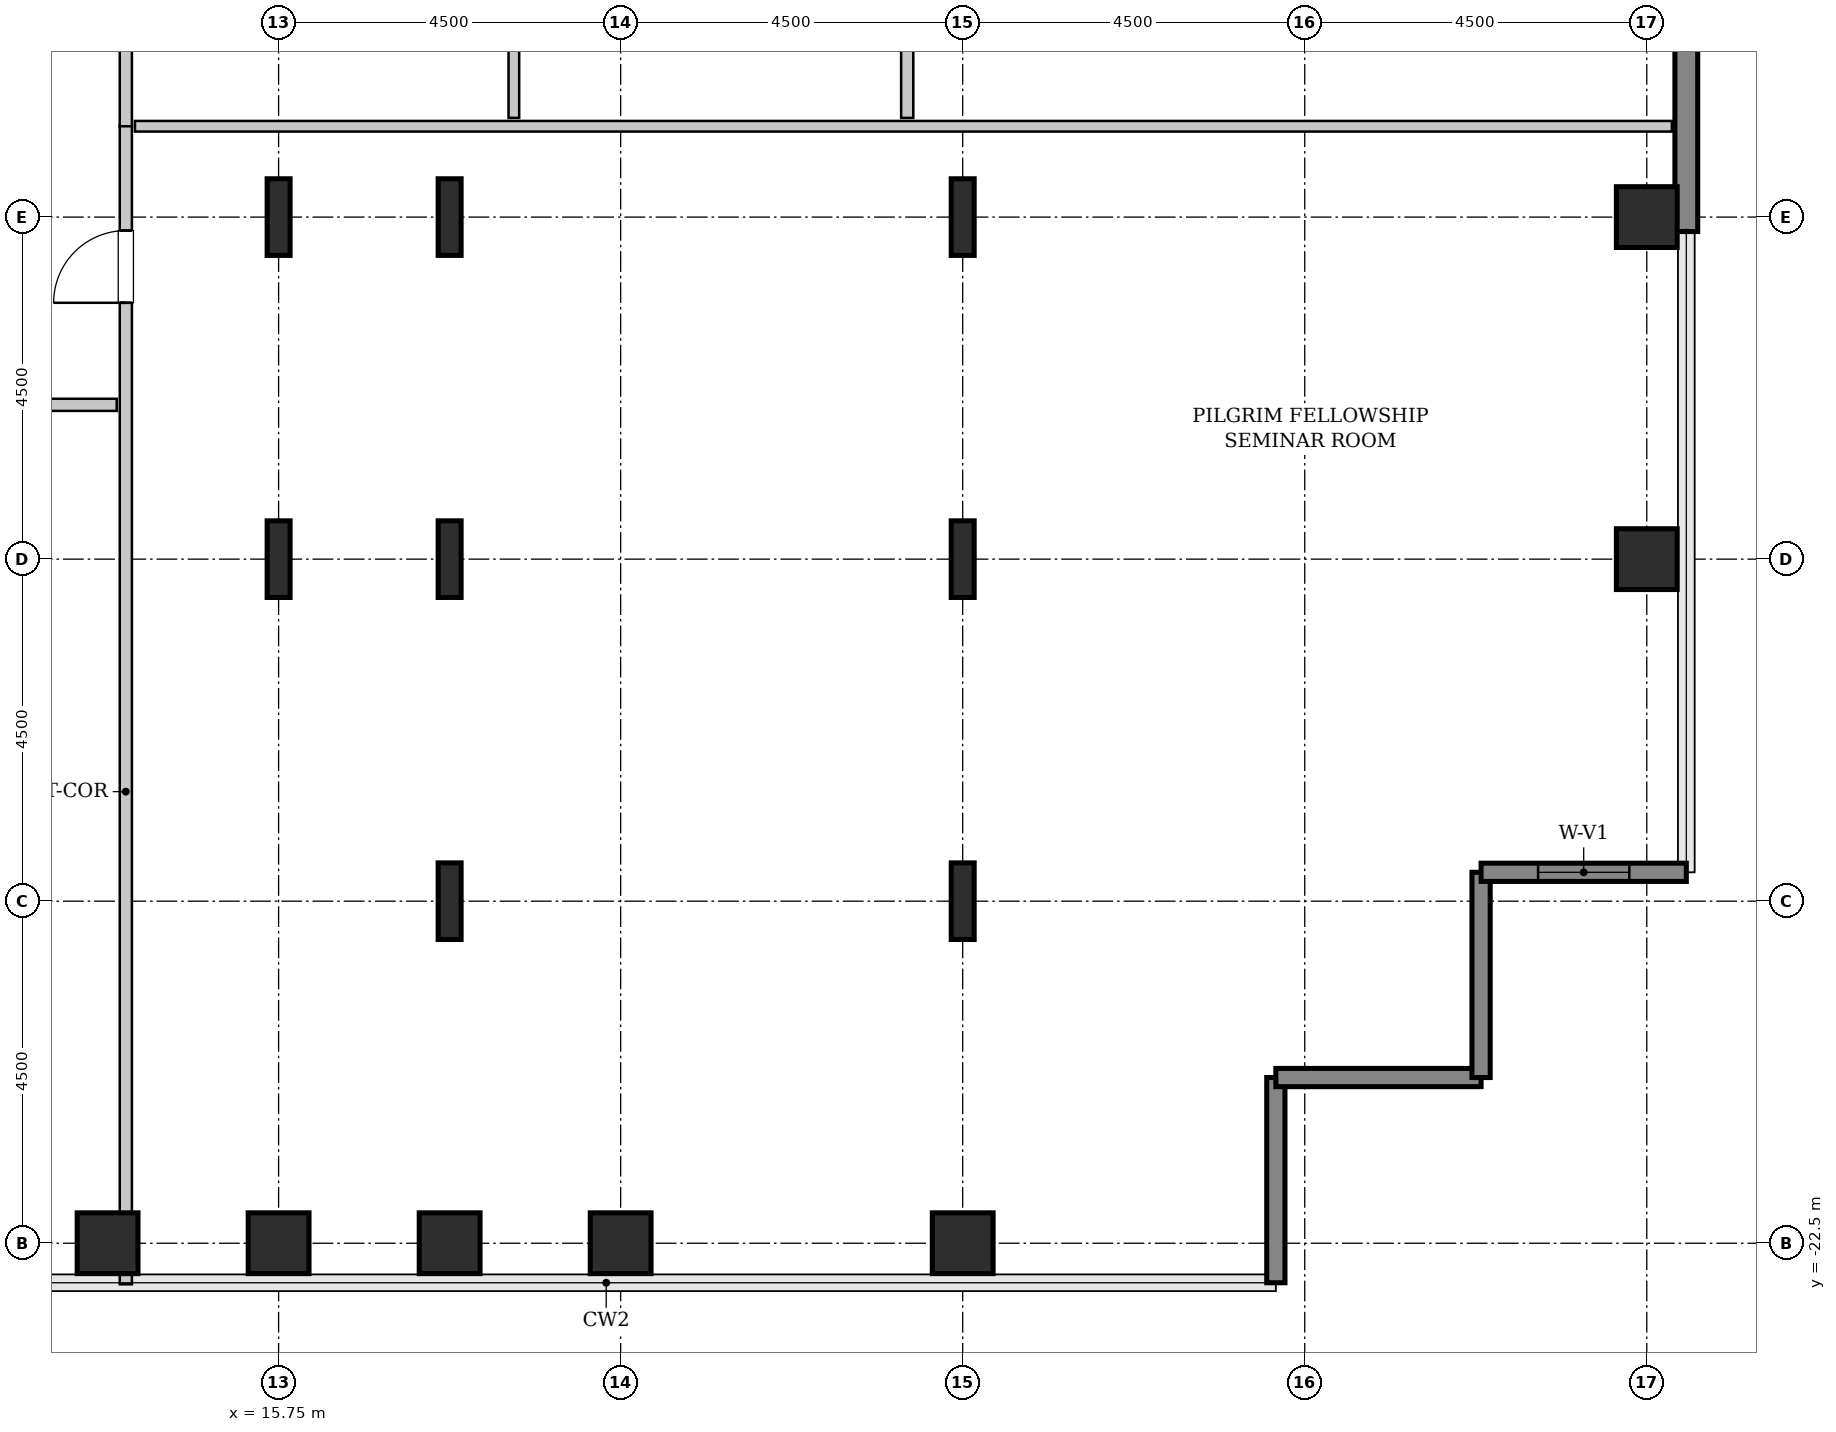
"""IFC4 building model, lengths in metres.
Left out: names, types, materials, properties, quantities, classifications, styles, units other than length and angle.
Written with IfcOpenShell. Run it as: python <this file> out.ifc"""

import sys

from ifc_helpers import new_model, si_unit, direction, frame, frame_2d, origin, origin_2d, place, context, subcontext, project, spatial, rectangle, hollow_rectangle, i_section, extrude, source, transform, mapped, element, fill, save


model = new_model("IFC4")
c1 = context("Model", 3, precision=1e-05, world=origin(), true_north=direction((0.0, 1.0)))
c2 = subcontext(c1, "Body", "Model", "MODEL_VIEW")
j1 = project(units=[si_unit("LENGTHUNIT", "METRE"), si_unit("PLANEANGLEUNIT", "RADIAN")], contexts=[c1])
p1 = place(None, origin())
s1 = spatial("IfcSite", under=j1, at=p1, CompositionType="ELEMENT")
p2 = place(p1, origin())
s2 = spatial("IfcBuilding", under=s1, at=p2, CompositionType="ELEMENT")
p3 = place(p2, frame((0.0, 0.0, 113.6)))
s3 = spatial("IfcBuildingStorey", under=s2, at=p3, CompositionType="ELEMENT", Elevation=113.6)
m1 = source(origin(), c2, "Body", "SweptSolid", [
    extrude(hollow_rectangle(XDim=0.8, YDim=0.8, WallThickness=0.04, InnerFilletRadius=0.04, OuterFilletRadius=0.08, at=origin_2d()), origin(), (0.0, 0.0, 1.0), 3.8),
])
for number, where, z_axis, x_axis in (
    (1, (13.5, -22.5, 0.0), (0.0, 0.0, 1.0), (1.0, 0.0, 0.0)),
    (2, (15.75, -22.5, 0.0), (0.0, 0.0, 1.0), (1.0, 0.0, 0.0)),
):
    element("IfcColumn", number, at=place(p3, frame(where, z_axis=z_axis, x_axis=x_axis)), inside=s3, PredefinedType="COLUMN", context=c2, shape_type="MappedRepresentation", body=[
        mapped(m1, transform((0.0, 0.0, 0.0), x_axis=(1.0, 0.0, 0.0), y_axis=(0.0, 1.0, 0.0), z_axis=(0.0, 0.0, 1.0), scale=1.0)),
    ])
m2 = source(origin(), c2, "Body", "SweptSolid", [
    extrude(i_section(OverallWidth=0.302, OverallDepth=1.008, WebThickness=0.021, FlangeThickness=0.04, FilletRadius=0.03, at=origin_2d()), origin(), (0.0, 0.0, 1.0), 3.8),
])
for number, where, z_axis, x_axis in (
    (3, (15.75, -13.5, 0.0), (0.0, 0.0, 1.0), (1.0, 0.0, 0.0)),
    (4, (15.75, -9.0, 0.0), (0.0, 0.0, 1.0), (1.0, 0.0, 0.0)),
):
    element("IfcColumn", number, at=place(p3, frame(where, z_axis=z_axis, x_axis=x_axis)), inside=s3, PredefinedType="COLUMN", context=c2, shape_type="MappedRepresentation", body=[
        mapped(m2, transform((0.0, 0.0, 0.0), x_axis=(1.0, 0.0, 0.0), y_axis=(0.0, 1.0, 0.0), z_axis=(0.0, 0.0, 1.0), scale=1.0)),
    ])
p4 = place(p3, frame((18.0, -22.5, 0.0), z_axis=(0.0, 0.0, 1.0), x_axis=(1.0, 0.0, 0.0)))
e5 = element("IfcColumn", 5, at=p4, inside=s3, PredefinedType="COLUMN", context=c2, shape_type="MappedRepresentation", body=[
    mapped(m1, transform((0.0, 0.0, 0.0), x_axis=(1.0, 0.0, 0.0), y_axis=(0.0, 1.0, 0.0), z_axis=(0.0, 0.0, 1.0), scale=1.0)),
])
for number, where, z_axis, x_axis in (
    (6, (18.0, -18.0, 0.0), (0.0, 0.0, 1.0), (1.0, 0.0, 0.0)),
    (7, (18.0, -13.5, 0.0), (0.0, 0.0, 1.0), (1.0, 0.0, 0.0)),
    (8, (18.0, -9.0, 0.0), (0.0, 0.0, 1.0), (1.0, 0.0, 0.0)),
):
    element("IfcColumn", number, at=place(p3, frame(where, z_axis=z_axis, x_axis=x_axis)), inside=s3, PredefinedType="COLUMN", context=c2, shape_type="MappedRepresentation", body=[
        mapped(m2, transform((0.0, 0.0, 0.0), x_axis=(1.0, 0.0, 0.0), y_axis=(0.0, 1.0, 0.0), z_axis=(0.0, 0.0, 1.0), scale=1.0)),
    ])
for number, where, z_axis, x_axis in (
    (9, (20.25, -22.5, 0.0), (0.0, 0.0, 1.0), (1.0, 0.0, 0.0)),
    (10, (24.75, -22.5, 0.0), (0.0, 0.0, 1.0), (1.0, 0.0, 0.0)),
):
    element("IfcColumn", number, at=place(p3, frame(where, z_axis=z_axis, x_axis=x_axis)), inside=s3, PredefinedType="COLUMN", context=c2, shape_type="MappedRepresentation", body=[
        mapped(m1, transform((0.0, 0.0, 0.0), x_axis=(1.0, 0.0, 0.0), y_axis=(0.0, 1.0, 0.0), z_axis=(0.0, 0.0, 1.0), scale=1.0)),
    ])
for number, where, z_axis, x_axis in (
    (11, (24.75, -18.0, 0.0), (0.0, 0.0, 1.0), (1.0, 0.0, 0.0)),
    (12, (24.75, -13.5, 0.0), (0.0, 0.0, 1.0), (1.0, 0.0, 0.0)),
    (13, (24.75, -9.0, 0.0), (0.0, 0.0, 1.0), (1.0, 0.0, 0.0)),
):
    element("IfcColumn", number, at=place(p3, frame(where, z_axis=z_axis, x_axis=x_axis)), inside=s3, PredefinedType="COLUMN", context=c2, shape_type="MappedRepresentation", body=[
        mapped(m2, transform((0.0, 0.0, 0.0), x_axis=(1.0, 0.0, 0.0), y_axis=(0.0, 1.0, 0.0), z_axis=(0.0, 0.0, 1.0), scale=1.0)),
    ])
for number, where, z_axis, x_axis in (
    (14, (33.75, -13.5, 0.0), (0.0, 0.0, 1.0), (1.0, 0.0, 0.0)),
    (15, (33.75, -9.0, 0.0), (0.0, 0.0, 1.0), (1.0, 0.0, 0.0)),
):
    element("IfcColumn", number, at=place(p3, frame(where, z_axis=z_axis, x_axis=x_axis)), inside=s3, PredefinedType="COLUMN", context=c2, shape_type="MappedRepresentation", body=[
        mapped(m1, transform((0.0, 0.0, 0.0), x_axis=(1.0, 0.0, 0.0), y_axis=(0.0, 1.0, 0.0), z_axis=(0.0, 0.0, 1.0), scale=1.0)),
    ])
m3 = source(origin(), c2, "Body", "SweptSolid", [
    extrude(rectangle(XDim=4.88, YDim=0.3, at=frame_2d((2.44, 0.0))), origin(), (0.0, 0.0, 1.0), 3.55),
])
p5 = place(p3, frame((34.27, -9.19, 0.0), z_axis=(0.0, 0.0, 1.0), x_axis=(0.0, 1.0, 0.0)))
e16 = element("IfcWall", 16, at=p5, inside=s3, PredefinedType="SHEAR", context=c2, shape_type="MappedRepresentation", body=[
    mapped(m3, transform((0.0, 0.0, 0.0), x_axis=(1.0, 0.0, 0.0), y_axis=(0.0, 1.0, 0.0), z_axis=(0.0, 0.0, 1.0), scale=1.0)),
])
m4 = source(origin(), c2, "Body", "SweptSolid", [
    extrude(rectangle(XDim=2.7, YDim=0.24, at=frame_2d((1.35, 0.0))), origin(), (0.0, 0.0, 1.0), 3.55),
])
for number, where, z_axis, x_axis in (
    (17, (28.87, -23.02, 0.0), (0.0, 0.0, 1.0), (0.0, 1.0, 0.0)),
    (18, (28.87, -20.32, 0.0), (0.0, 0.0, 1.0), (1.0, 0.0, 0.0)),
    (19, (31.57, -20.32, 0.0), (0.0, 0.0, 1.0), (0.0, 1.0, 0.0)),
):
    element("IfcWall", number, at=place(p3, frame(where, z_axis=z_axis, x_axis=x_axis)), inside=s3, PredefinedType="SHEAR", context=c2, shape_type="MappedRepresentation", body=[
        mapped(m4, transform((0.0, 0.0, 0.0), x_axis=(1.0, 0.0, 0.0), y_axis=(0.0, 1.0, 0.0), z_axis=(0.0, 0.0, 1.0), scale=1.0)),
    ])
p6 = place(p3, frame((31.57, -17.62, 0.0), z_axis=(0.0, 0.0, 1.0), x_axis=(1.0, 0.0, 0.0)))
e20 = element("IfcWall", 20, at=p6, inside=s3, PredefinedType="SHEAR", context=c2, shape_type="MappedRepresentation", body=[
    mapped(m4, transform((0.0, 0.0, 0.0), x_axis=(1.0, 0.0, 0.0), y_axis=(0.0, 1.0, 0.0), z_axis=(0.0, 0.0, 1.0), scale=1.0)),
])
p7 = place(p6, frame((0.75, 0.0, 0.85)))
e21 = element("IfcOpeningElement", 21, at=p7, cuts=e20, PredefinedType="OPENING", context=c2, shape_type="SweptSolid", body=[
    extrude(rectangle(XDim=1.2, YDim=1.8, at=frame_2d((0.6, 0.9))), frame((0.0, 0.13, 0.0), z_axis=(0.0, -1.0, 0.0), x_axis=(1.0, 0.0, 0.0)), (0.0, 0.0, 1.0), 0.26),
])
m5 = source(origin(), c2, "Body", "SweptSolid", [
    extrude(rectangle(XDim=15.245, YDim=0.16, at=frame_2d((7.623, 0.0))), origin(), (0.0, 0.0, 1.0), 3.535),
])
p8 = place(p3, frame((13.74, -23.04, 0.0), z_axis=(0.0, 0.0, 1.0), x_axis=(0.0, 1.0, 0.0)))
e22 = element("IfcWall", 22, at=p8, inside=s3, PredefinedType="PARTITIONING", context=c2, shape_type="MappedRepresentation", body=[
    mapped(m5, transform((0.0, 0.0, 0.0), x_axis=(1.0, 0.0, 0.0), y_axis=(0.0, 1.0, 0.0), z_axis=(0.0, 0.0, 1.0), scale=1.0)),
])
p9 = place(p8, frame((12.913, 0.0, 0.0)))
e23 = element("IfcOpeningElement", 23, at=p9, cuts=e22, PredefinedType="OPENING", context=c2, shape_type="SweptSolid", body=[
    extrude(rectangle(XDim=0.95, YDim=2.1, at=frame_2d((0.475, 1.05))), frame((0.0, 0.09, 0.0), z_axis=(0.0, -1.0, 0.0), x_axis=(1.0, 0.0, 0.0)), (0.0, 0.0, 1.0), 0.18),
])
m6 = source(origin(), c2, "Body", "SweptSolid", [
    extrude(rectangle(XDim=20.22, YDim=0.14, at=frame_2d((10.11, 0.0))), origin(), (0.0, 0.0, 1.0), 3.535),
])
p10 = place(p3, frame((13.86, -7.805, 0.0), z_axis=(0.0, 0.0, 1.0), x_axis=(1.0, 0.0, 0.0)))
e24 = element("IfcWall", 24, at=p10, inside=s3, PredefinedType="PARTITIONING", context=c2, shape_type="MappedRepresentation", body=[
    mapped(m6, transform((0.0, 0.0, 0.0), x_axis=(1.0, 0.0, 0.0), y_axis=(0.0, 1.0, 0.0), z_axis=(0.0, 0.0, 1.0), scale=1.0)),
])
m7 = source(origin(), c2, "Body", "SweptSolid", [
    extrude(rectangle(XDim=15.5, YDim=0.16, at=frame_2d((7.75, 0.0))), origin(), (0.0, 0.0, 1.0), 3.535),
])
p11 = place(p3, frame((24.02, -7.695, 0.0), z_axis=(0.0, 0.0, 1.0), x_axis=(0.0, 1.0, 0.0)))
e25 = element("IfcWall", 25, at=p11, inside=s3, PredefinedType="PARTITIONING", context=c2, shape_type="MappedRepresentation", body=[
    mapped(m7, transform((0.0, 0.0, 0.0), x_axis=(1.0, 0.0, 0.0), y_axis=(0.0, 1.0, 0.0), z_axis=(0.0, 0.0, 1.0), scale=1.0)),
])
p12 = place(p11, frame((9.47, 0.0, 0.0)))
e26 = element("IfcOpeningElement", 26, at=p12, cuts=e25, PredefinedType="OPENING", context=c2, shape_type="SweptSolid", body=[
    extrude(rectangle(XDim=0.95, YDim=2.1, at=frame_2d((0.475, 1.05))), frame((0.0, 0.09, 0.0), z_axis=(0.0, -1.0, 0.0), x_axis=(1.0, 0.0, 0.0)), (0.0, 0.0, 1.0), 0.18),
])
m8 = source(origin(), c2, "Body", "SweptSolid", [
    extrude(rectangle(XDim=9.195, YDim=0.16, at=frame_2d((4.597, 0.0))), origin(), (0.0, 0.0, 1.0), 3.535),
])
p13 = place(p3, frame((13.74, -7.805, 0.0), z_axis=(0.0, 0.0, 1.0), x_axis=(0.0, 1.0, 0.0)))
e27 = element("IfcWall", 27, at=p13, inside=s3, PredefinedType="PARTITIONING", context=c2, shape_type="MappedRepresentation", body=[
    mapped(m8, transform((0.0, 0.0, 0.0), x_axis=(1.0, 0.0, 0.0), y_axis=(0.0, 1.0, 0.0), z_axis=(0.0, 0.0, 1.0), scale=1.0)),
])
p14 = place(p13, frame((4.123, 0.0, 0.0)))
e28 = element("IfcOpeningElement", 28, at=p14, cuts=e27, PredefinedType="OPENING", context=c2, shape_type="SweptSolid", body=[
    extrude(rectangle(XDim=0.95, YDim=2.1, at=frame_2d((0.475, 1.05))), frame((0.0, 0.09, 0.0), z_axis=(0.0, -1.0, 0.0), x_axis=(1.0, 0.0, 0.0)), (0.0, 0.0, 1.0), 0.18),
])
m9 = source(origin(), c2, "Body", "SweptSolid", [
    extrude(rectangle(XDim=8.965, YDim=0.14, at=frame_2d((4.482, 0.0))), origin(), (0.0, 0.0, 1.0), 3.535),
])
p15 = place(p3, frame((18.845, -7.695, 0.0), z_axis=(0.0, 0.0, 1.0), x_axis=(0.0, 1.0, 0.0)))
e29 = element("IfcWall", 29, at=p15, inside=s3, PredefinedType="PARTITIONING", context=c2, shape_type="MappedRepresentation", body=[
    mapped(m9, transform((0.0, 0.0, 0.0), x_axis=(1.0, 0.0, 0.0), y_axis=(0.0, 1.0, 0.0), z_axis=(0.0, 0.0, 1.0), scale=1.0)),
])
m10 = source(origin(), c2, "Body", "SweptSolid", [
    extrude(rectangle(XDim=5.225, YDim=0.16, at=frame_2d((2.613, 0.0))), origin(), (0.0, 0.0, 1.0), 3.535),
])
p16 = place(p3, frame((8.395, -11.47, 0.0), z_axis=(0.0, 0.0, 1.0), x_axis=(1.0, 0.0, 0.0)))
e30 = element("IfcWall", 30, at=p16, inside=s3, PredefinedType="PARTITIONING", context=c2, shape_type="MappedRepresentation", body=[
    mapped(m10, transform((0.0, 0.0, 0.0), x_axis=(1.0, 0.0, 0.0), y_axis=(0.0, 1.0, 0.0), z_axis=(0.0, 0.0, 1.0), scale=1.0)),
])
p17 = place(p16, frame((2.137, 0.0, 0.0)))
e31 = element("IfcOpeningElement", 31, at=p17, cuts=e30, PredefinedType="OPENING", context=c2, shape_type="SweptSolid", body=[
    extrude(rectangle(XDim=0.95, YDim=2.1, at=frame_2d((0.475, 1.05))), frame((0.0, 0.09, 0.0), z_axis=(0.0, -1.0, 0.0), x_axis=(1.0, 0.0, 0.0)), (0.0, 0.0, 1.0), 0.18),
])
m11 = source(origin(), c2, "Body", "SweptSolid", [
    extrude(rectangle(XDim=1.2, YDim=1.8, at=frame_2d((0.6, 0.9))), frame((0.0, 0.03, 0.0), z_axis=(0.0, -1.0, 0.0), x_axis=(1.0, 0.0, 0.0)), (0.0, 0.0, 1.0), 0.06),
])
p18 = place(p7, origin())
e32 = element("IfcWindow", 32, at=p18, inside=s3, PartitioningType="SINGLE_PANEL", PredefinedType="WINDOW", context=c2, shape_type="MappedRepresentation", body=[
    mapped(m11, transform((0.0, 0.0, 0.0), x_axis=(1.0, 0.0, 0.0), y_axis=(0.0, 1.0, 0.0), z_axis=(0.0, 0.0, 1.0), scale=1.0)),
])
fill(e21, e32)
m12 = source(origin(), c2, "Body", "SweptSolid", [
    extrude(rectangle(XDim=0.95, YDim=2.1, at=frame_2d((0.475, 1.05))), frame((0.0, 0.025, 0.0), z_axis=(0.0, -1.0, 0.0), x_axis=(1.0, 0.0, 0.0)), (0.0, 0.0, 1.0), 0.05),
])
p19 = place(p9, origin())
e33 = element("IfcDoor", 33, at=p19, inside=s3, OperationType="SINGLE_SWING_LEFT", PredefinedType="DOOR", context=c2, shape_type="MappedRepresentation", body=[
    mapped(m12, transform((0.0, 0.0, 0.0), x_axis=(1.0, 0.0, 0.0), y_axis=(0.0, 1.0, 0.0), z_axis=(0.0, 0.0, 1.0), scale=1.0)),
])
fill(e23, e33)
save(model, sys.argv[1])
